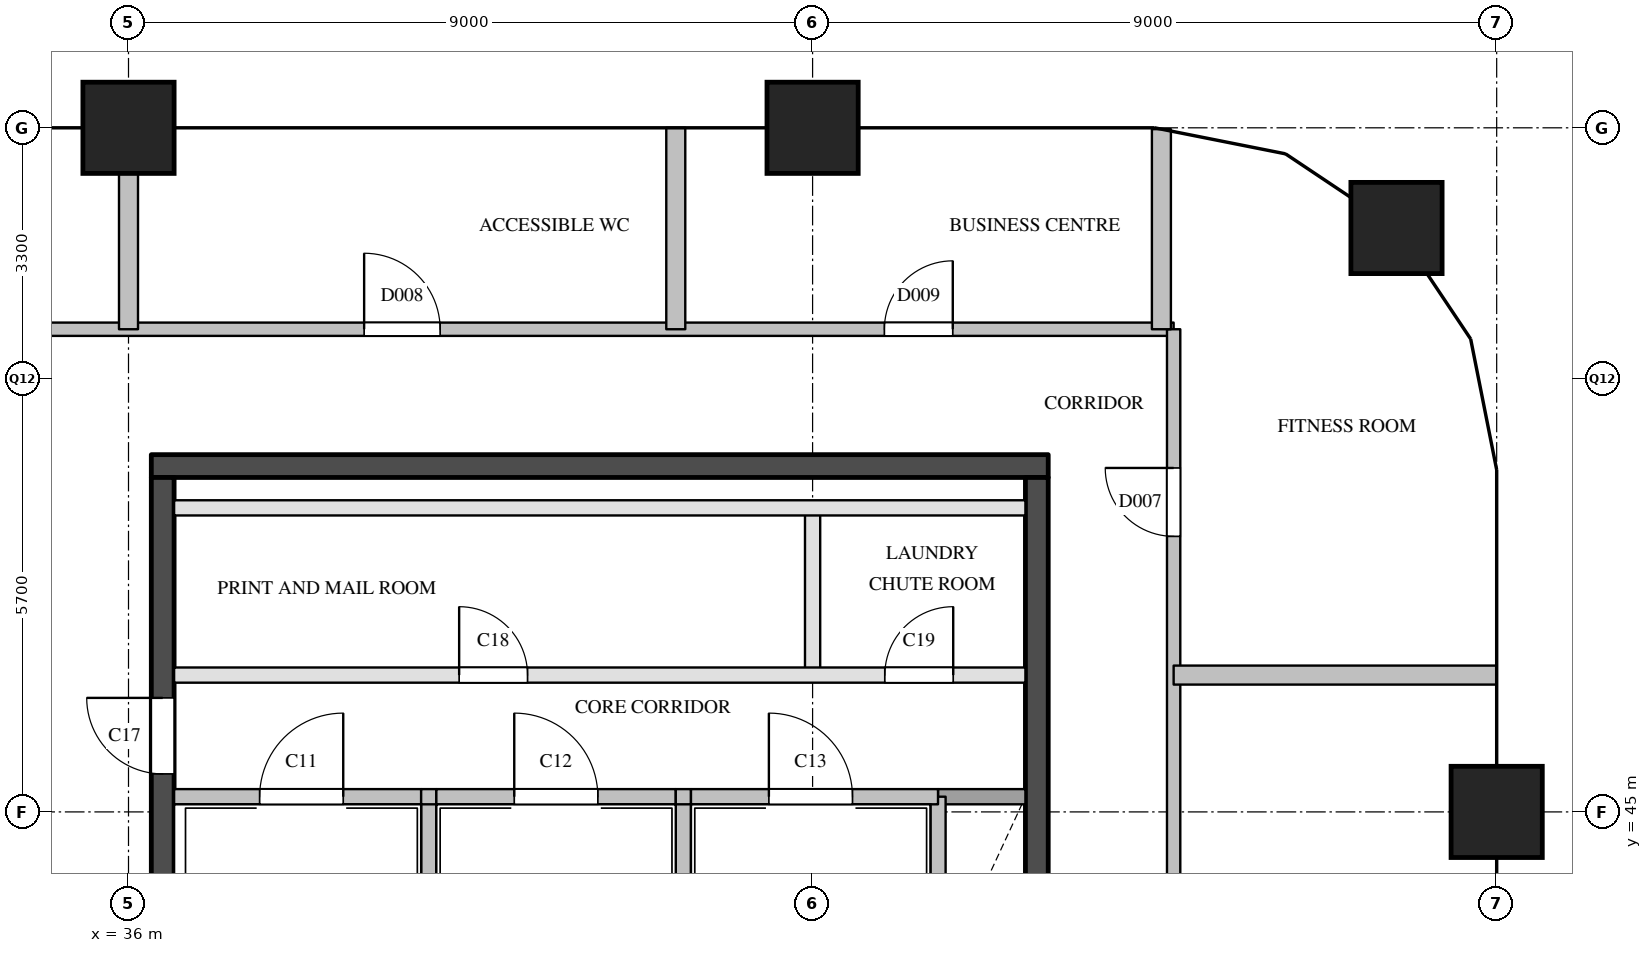
"""IFC4 building model, lengths in metres.
Left out: names, types, materials, properties, quantities, classifications, styles, units other than length and angle.
Written with IfcOpenShell. Run it as: python <this file> out.ifc"""

import sys

from ifc_helpers import new_model, si_unit, direction, frame, frame_2d, origin, origin_2d, place, context, subcontext, project, spatial, rectangle, extrude, element, fill, save


model = new_model("IFC4")
c1 = context("Model", 3, precision=1e-05, world=origin(), true_north=direction((0.0, 1.0)))
c2 = subcontext(c1, "Body", "Model", "MODEL_VIEW")
j1 = project(units=[si_unit("LENGTHUNIT", "METRE"), si_unit("PLANEANGLEUNIT", "RADIAN")], contexts=[c1])
p1 = place(None, origin())
s1 = spatial("IfcSite", under=j1, at=p1, CompositionType="ELEMENT")
p2 = place(p1, origin())
s2 = spatial("IfcBuilding", under=s1, at=p2, CompositionType="ELEMENT")
p3 = place(p2, frame((0.0, 0.0, 290.2)))
s3 = spatial("IfcBuildingStorey", under=s2, at=p3, CompositionType="ELEMENT", Elevation=290.2)
for number, where, z_axis, x_axis in (
    (1, (36.0, 54.0, 0.0), (0.0, 0.0, 1.0), (1.0, 0.0, 0.0)),
    (2, (45.0, 54.0, 0.0), (0.0, 0.0, 1.0), (1.0, 0.0, 0.0)),
    (3, (54.0, 45.0, 0.0), (0.0, 0.0, 1.0), (1.0, 0.0, 0.0)),
    (4, (52.682, 52.682, 0.0), (0.0, 0.0, 1.0), (1.0, 0.0, 0.0)),
):
    element("IfcColumn", number, at=place(p3, frame(where, z_axis=z_axis, x_axis=x_axis)), inside=s3, PredefinedType="COLUMN", context=c2, shape_type="SweptSolid", body=[
        extrude(rectangle(XDim=1.2, YDim=1.2, at=origin_2d()), origin(), (0.0, 0.0, 1.0), 5.0),
    ])
p4 = place(p3, frame((36.3, 49.55, 0.0), z_axis=(0.0, 0.0, 1.0), x_axis=(1.0, 0.0, 0.0)))
e5 = element("IfcWall", 5, at=p4, inside=s3, PredefinedType="SHEAR", context=c2, shape_type="SweptSolid", body=[
    extrude(rectangle(XDim=11.8, YDim=0.3, at=frame_2d((5.9, 0.0))), origin(), (0.0, 0.0, 1.0), 4.5),
])
p5 = place(p3, frame((36.45, 29.1, 0.0), z_axis=(0.0, 0.0, 1.0), x_axis=(0.0, 1.0, 0.0)))
e6 = element("IfcWall", 6, at=p5, inside=s3, PredefinedType="SHEAR", context=c2, shape_type="SweptSolid", body=[
    extrude(rectangle(XDim=20.3, YDim=0.3, at=frame_2d((10.15, 0.0))), origin(), (0.0, 0.0, 1.0), 4.5),
])
p6 = place(p5, frame((3.6, 0.0, 0.0)))
e7 = element("IfcOpeningElement", 7, at=p6, cuts=e6, PredefinedType="OPENING", context=c2, shape_type="SweptSolid", body=[
    extrude(rectangle(XDim=1.8, YDim=2.1, at=frame_2d((0.9, 1.05))), frame((0.0, 0.16, 0.0), z_axis=(0.0, -1.0, 0.0), x_axis=(1.0, 0.0, 0.0)), (0.0, 0.0, 1.0), 0.32),
])
p7 = place(p5, frame((16.4, 0.0, 0.0)))
e8 = element("IfcOpeningElement", 8, at=p7, cuts=e6, PredefinedType="OPENING", context=c2, shape_type="SweptSolid", body=[
    extrude(rectangle(XDim=1.0, YDim=2.1, at=frame_2d((0.5, 1.05))), frame((0.0, 0.16, 0.0), z_axis=(0.0, -1.0, 0.0), x_axis=(1.0, 0.0, 0.0)), (0.0, 0.0, 1.0), 0.32),
])
p8 = place(p3, frame((47.95, 29.1, 0.0), z_axis=(0.0, 0.0, 1.0), x_axis=(0.0, 1.0, 0.0)))
e9 = element("IfcWall", 9, at=p8, inside=s3, PredefinedType="SHEAR", context=c2, shape_type="SweptSolid", body=[
    extrude(rectangle(XDim=20.3, YDim=0.3, at=frame_2d((10.15, 0.0))), origin(), (0.0, 0.0, 1.0), 4.5),
])
p9 = place(p8, frame((12.5, 0.0, 0.0)))
e10 = element("IfcOpeningElement", 10, at=p9, cuts=e9, PredefinedType="OPENING", context=c2, shape_type="SweptSolid", body=[
    extrude(rectangle(XDim=0.7, YDim=2.1, at=frame_2d((0.35, 1.05))), frame((0.0, 0.16, 0.0), z_axis=(0.0, -1.0, 0.0), x_axis=(1.0, 0.0, 0.0)), (0.0, 0.0, 1.0), 0.32),
])
p10 = place(p8, frame((3.9, 0.0, 0.0)))
e11 = element("IfcOpeningElement", 11, at=p10, cuts=e9, PredefinedType="OPENING", context=c2, shape_type="SweptSolid", body=[
    extrude(rectangle(XDim=1.8, YDim=2.1, at=frame_2d((0.9, 1.05))), frame((0.0, 0.16, 0.0), z_axis=(0.0, -1.0, 0.0), x_axis=(1.0, 0.0, 0.0)), (0.0, 0.0, 1.0), 0.32),
])
for number, where, z_axis, x_axis in (
    (12, (39.95, 43.58, 0.0), (0.0, 0.0, 1.0), (0.0, 1.0, 0.0)),
    (13, (43.3, 43.58, 0.0), (0.0, 0.0, 1.0), (0.0, 1.0, 0.0)),
):
    element("IfcWall", number, at=place(p3, frame(where, z_axis=z_axis, x_axis=x_axis)), inside=s3, PredefinedType="SOLIDWALL", context=c2, shape_type="SweptSolid", body=[
        extrude(rectangle(XDim=1.62, YDim=0.2, at=frame_2d((0.81, 0.0))), origin(), (0.0, 0.0, 1.0), 4.5),
    ])
p11 = place(p3, frame((45.0, 46.8, 0.0), z_axis=(0.0, 0.0, 1.0), x_axis=(0.0, 1.0, 0.0)))
e14 = element("IfcWall", 14, at=p11, inside=s3, PredefinedType="PARTITIONING", context=c2, shape_type="SweptSolid", body=[
    extrude(rectangle(XDim=2.2, YDim=0.2, at=frame_2d((1.1, 0.0))), origin(), (0.0, 0.0, 1.0), 4.5),
])
p12 = place(p3, frame((46.65, 43.58, 0.0), z_axis=(0.0, 0.0, 1.0), x_axis=(0.0, 1.0, 0.0)))
e15 = element("IfcWall", 15, at=p12, inside=s3, PredefinedType="SOLIDWALL", context=c2, shape_type="SweptSolid", body=[
    extrude(rectangle(XDim=1.62, YDim=0.2, at=frame_2d((0.81, 0.0))), origin(), (0.0, 0.0, 1.0), 4.5),
])
p13 = place(p3, frame((46.65, 45.2, 0.0), z_axis=(0.0, 0.0, 1.0), x_axis=(1.0, 0.0, 0.0)))
e16 = element("IfcWall", 16, at=p13, inside=s3, PredefinedType="SOLIDWALL", context=c2, shape_type="SweptSolid", body=[
    extrude(rectangle(XDim=1.15, YDim=0.2, at=frame_2d((0.575, 0.0))), origin(), (0.0, 0.0, 1.0), 4.5),
])
p14 = place(p3, frame((36.6, 45.2, 0.0), z_axis=(0.0, 0.0, 1.0), x_axis=(1.0, 0.0, 0.0)))
e17 = element("IfcWall", 17, at=p14, inside=s3, PredefinedType="SOLIDWALL", context=c2, shape_type="SweptSolid", body=[
    extrude(rectangle(XDim=3.25, YDim=0.2, at=frame_2d((1.625, 0.0))), origin(), (0.0, 0.0, 1.0), 4.5),
])
p15 = place(p14, frame((1.125, 0.0, 0.0)))
e18 = element("IfcOpeningElement", 18, at=p15, cuts=e17, PredefinedType="OPENING", context=c2, shape_type="SweptSolid", body=[
    extrude(rectangle(XDim=1.1, YDim=2.1, at=frame_2d((0.55, 1.05))), frame((0.0, 0.11, 0.0), z_axis=(0.0, -1.0, 0.0), x_axis=(1.0, 0.0, 0.0)), (0.0, 0.0, 1.0), 0.22),
])
p16 = place(p3, frame((39.85, 45.2, 0.0), z_axis=(0.0, 0.0, 1.0), x_axis=(1.0, 0.0, 0.0)))
e19 = element("IfcWall", 19, at=p16, inside=s3, PredefinedType="SOLIDWALL", context=c2, shape_type="SweptSolid", body=[
    extrude(rectangle(XDim=0.2, YDim=0.2, at=frame_2d((0.1, 0.0))), origin(), (0.0, 0.0, 1.0), 4.5),
])
p17 = place(p3, frame((40.05, 45.2, 0.0), z_axis=(0.0, 0.0, 1.0), x_axis=(1.0, 0.0, 0.0)))
e20 = element("IfcWall", 20, at=p17, inside=s3, PredefinedType="SOLIDWALL", context=c2, shape_type="SweptSolid", body=[
    extrude(rectangle(XDim=3.15, YDim=0.2, at=frame_2d((1.575, 0.0))), origin(), (0.0, 0.0, 1.0), 4.5),
])
p18 = place(p17, frame((1.025, 0.0, 0.0)))
e21 = element("IfcOpeningElement", 21, at=p18, cuts=e20, PredefinedType="OPENING", context=c2, shape_type="SweptSolid", body=[
    extrude(rectangle(XDim=1.1, YDim=2.1, at=frame_2d((0.55, 1.05))), frame((0.0, 0.11, 0.0), z_axis=(0.0, -1.0, 0.0), x_axis=(1.0, 0.0, 0.0)), (0.0, 0.0, 1.0), 0.22),
])
p19 = place(p3, frame((43.2, 45.2, 0.0), z_axis=(0.0, 0.0, 1.0), x_axis=(1.0, 0.0, 0.0)))
e22 = element("IfcWall", 22, at=p19, inside=s3, PredefinedType="SOLIDWALL", context=c2, shape_type="SweptSolid", body=[
    extrude(rectangle(XDim=0.2, YDim=0.2, at=frame_2d((0.1, 0.0))), origin(), (0.0, 0.0, 1.0), 4.5),
])
p20 = place(p3, frame((43.4, 45.2, 0.0), z_axis=(0.0, 0.0, 1.0), x_axis=(1.0, 0.0, 0.0)))
e23 = element("IfcWall", 23, at=p20, inside=s3, PredefinedType="SOLIDWALL", context=c2, shape_type="SweptSolid", body=[
    extrude(rectangle(XDim=3.25, YDim=0.2, at=frame_2d((1.625, 0.0))), origin(), (0.0, 0.0, 1.0), 4.5),
])
p21 = place(p20, frame((1.025, 0.0, 0.0)))
e24 = element("IfcOpeningElement", 24, at=p21, cuts=e23, PredefinedType="OPENING", context=c2, shape_type="SweptSolid", body=[
    extrude(rectangle(XDim=1.1, YDim=2.1, at=frame_2d((0.55, 1.05))), frame((0.0, 0.11, 0.0), z_axis=(0.0, -1.0, 0.0), x_axis=(1.0, 0.0, 0.0)), (0.0, 0.0, 1.0), 0.22),
])
p22 = place(p3, frame((36.6, 46.8, 0.0), z_axis=(0.0, 0.0, 1.0), x_axis=(1.0, 0.0, 0.0)))
e25 = element("IfcWall", 25, at=p22, inside=s3, PredefinedType="PARTITIONING", context=c2, shape_type="SweptSolid", body=[
    extrude(rectangle(XDim=11.2, YDim=0.2, at=frame_2d((5.6, 0.0))), origin(), (0.0, 0.0, 1.0), 4.5),
])
p23 = place(p22, frame((3.75, 0.0, 0.0)))
e26 = element("IfcOpeningElement", 26, at=p23, cuts=e25, PredefinedType="OPENING", context=c2, shape_type="SweptSolid", body=[
    extrude(rectangle(XDim=0.9, YDim=2.1, at=frame_2d((0.45, 1.05))), frame((0.0, 0.11, 0.0), z_axis=(0.0, -1.0, 0.0), x_axis=(1.0, 0.0, 0.0)), (0.0, 0.0, 1.0), 0.22),
])
p24 = place(p22, frame((9.35, 0.0, 0.0)))
e27 = element("IfcOpeningElement", 27, at=p24, cuts=e25, PredefinedType="OPENING", context=c2, shape_type="SweptSolid", body=[
    extrude(rectangle(XDim=0.9, YDim=2.1, at=frame_2d((0.45, 1.05))), frame((0.0, 0.11, 0.0), z_axis=(0.0, -1.0, 0.0), x_axis=(1.0, 0.0, 0.0)), (0.0, 0.0, 1.0), 0.22),
])
p25 = place(p3, frame((36.6, 49.0, 0.0), z_axis=(0.0, 0.0, 1.0), x_axis=(1.0, 0.0, 0.0)))
e28 = element("IfcWall", 28, at=p25, inside=s3, PredefinedType="PARTITIONING", context=c2, shape_type="SweptSolid", body=[
    extrude(rectangle(XDim=11.2, YDim=0.2, at=frame_2d((5.6, 0.0))), origin(), (0.0, 0.0, 1.0), 4.5),
])
p26 = place(p3, frame((34.65, 51.35, 0.0), z_axis=(0.0, 0.0, 1.0), x_axis=(1.0, 0.0, 0.0)))
e29 = element("IfcWall", 29, at=p26, inside=s3, PredefinedType="PARTITIONING", context=c2, shape_type="SweptSolid", body=[
    extrude(rectangle(XDim=15.1, YDim=0.175, at=frame_2d((7.55, 0.0))), origin(), (0.0, 0.0, 1.0), 4.5),
])
p27 = place(p26, frame((4.45, 0.0, 0.0)))
e30 = element("IfcOpeningElement", 30, at=p27, cuts=e29, PredefinedType="OPENING", context=c2, shape_type="SweptSolid", body=[
    extrude(rectangle(XDim=1.0, YDim=2.1, at=frame_2d((0.5, 1.05))), frame((0.0, 0.097, 0.0), z_axis=(0.0, -1.0, 0.0), x_axis=(1.0, 0.0, 0.0)), (0.0, 0.0, 1.0), 0.195),
])
p28 = place(p26, frame((11.294, 0.0, 0.0)))
e31 = element("IfcOpeningElement", 31, at=p28, cuts=e29, PredefinedType="OPENING", context=c2, shape_type="SweptSolid", body=[
    extrude(rectangle(XDim=0.9, YDim=2.1, at=frame_2d((0.45, 1.05))), frame((0.0, 0.097, 0.0), z_axis=(0.0, -1.0, 0.0), x_axis=(1.0, 0.0, 0.0)), (0.0, 0.0, 1.0), 0.195),
])
p29 = place(p3, frame((49.75, 28.5, 0.0), z_axis=(0.0, 0.0, 1.0), x_axis=(0.0, 1.0, 0.0)))
e32 = element("IfcWall", 32, at=p29, inside=s3, PredefinedType="PARTITIONING", context=c2, shape_type="SweptSolid", body=[
    extrude(rectangle(XDim=22.85, YDim=0.175, at=frame_2d((11.425, 0.0))), origin(), (0.0, 0.0, 1.0), 4.5),
])
p30 = place(p29, frame((3.3, 0.0, 0.0)))
e33 = element("IfcOpeningElement", 33, at=p30, cuts=e32, PredefinedType="OPENING", context=c2, shape_type="SweptSolid", body=[
    extrude(rectangle(XDim=0.9, YDim=2.1, at=frame_2d((0.45, 1.05))), frame((0.0, 0.097, 0.0), z_axis=(0.0, -1.0, 0.0), x_axis=(1.0, 0.0, 0.0)), (0.0, 0.0, 1.0), 0.195),
])
p31 = place(p29, frame((12.45, 0.0, 0.0)))
e34 = element("IfcOpeningElement", 34, at=p31, cuts=e32, PredefinedType="OPENING", context=c2, shape_type="SweptSolid", body=[
    extrude(rectangle(XDim=0.9, YDim=2.1, at=frame_2d((0.45, 1.05))), frame((0.0, 0.097, 0.0), z_axis=(0.0, -1.0, 0.0), x_axis=(1.0, 0.0, 0.0)), (0.0, 0.0, 1.0), 0.195),
])
p32 = place(p29, frame((20.125, 0.0, 0.0)))
e35 = element("IfcOpeningElement", 35, at=p32, cuts=e32, PredefinedType="OPENING", context=c2, shape_type="SweptSolid", body=[
    extrude(rectangle(XDim=0.9, YDim=2.1, at=frame_2d((0.45, 1.05))), frame((0.0, 0.097, 0.0), z_axis=(0.0, -1.0, 0.0), x_axis=(1.0, 0.0, 0.0)), (0.0, 0.0, 1.0), 0.195),
])
p33 = place(p3, frame((49.75, 46.8, 0.0), z_axis=(0.0, 0.0, 1.0), x_axis=(1.0, 0.0, 0.0)))
e36 = element("IfcWall", 36, at=p33, inside=s3, PredefinedType="PARTITIONING", context=c2, shape_type="SweptSolid", body=[
    extrude(rectangle(XDim=4.25, YDim=0.25, at=frame_2d((2.125, 0.0))), origin(), (0.0, 0.0, 1.0), 3.5),
])
p34 = place(p3, frame((36.0, 51.35, 0.0), z_axis=(0.0, 0.0, 1.0), x_axis=(0.0, 1.0, 0.0)))
e37 = element("IfcWall", 37, at=p34, inside=s3, PredefinedType="PARTITIONING", context=c2, shape_type="SweptSolid", body=[
    extrude(rectangle(XDim=2.65, YDim=0.25, at=frame_2d((1.325, 0.0))), origin(), (0.0, 0.0, 1.0), 4.5),
])
p35 = place(p3, frame((43.2, 51.35, 0.0), z_axis=(0.0, 0.0, 1.0), x_axis=(0.0, 1.0, 0.0)))
e38 = element("IfcWall", 38, at=p35, inside=s3, PredefinedType="PARTITIONING", context=c2, shape_type="SweptSolid", body=[
    extrude(rectangle(XDim=2.65, YDim=0.25, at=frame_2d((1.325, 0.0))), origin(), (0.0, 0.0, 1.0), 3.5),
])
p36 = place(p3, frame((49.589, 51.35, 0.0), z_axis=(0.0, 0.0, 1.0), x_axis=(0.0, 1.0, 0.0)))
e39 = element("IfcWall", 39, at=p36, inside=s3, PredefinedType="PARTITIONING", context=c2, shape_type="SweptSolid", body=[
    extrude(rectangle(XDim=2.632, YDim=0.25, at=frame_2d((1.316, 0.0))), origin(), (0.0, 0.0, 1.0), 3.5),
])
p37 = place(p15, origin())
e40 = element("IfcDoor", 40, at=p37, inside=s3, OperationType="SINGLE_SWING_RIGHT", PredefinedType="DOOR", context=c2, shape_type="SweptSolid", body=[
    extrude(rectangle(XDim=1.1, YDim=2.1, at=frame_2d((0.55, 1.05))), frame((0.0, 0.025, 0.0), z_axis=(0.0, -1.0, 0.0), x_axis=(1.0, 0.0, 0.0)), (0.0, 0.0, 1.0), 0.05),
])
fill(e18, e40)
p38 = place(p18, origin())
e41 = element("IfcDoor", 41, at=p38, inside=s3, OperationType="SINGLE_SWING_LEFT", PredefinedType="DOOR", context=c2, shape_type="SweptSolid", body=[
    extrude(rectangle(XDim=1.1, YDim=2.1, at=frame_2d((0.55, 1.05))), frame((0.0, 0.025, 0.0), z_axis=(0.0, -1.0, 0.0), x_axis=(1.0, 0.0, 0.0)), (0.0, 0.0, 1.0), 0.05),
])
fill(e21, e41)
p39 = place(p21, origin())
e42 = element("IfcDoor", 42, at=p39, inside=s3, OperationType="SINGLE_SWING_LEFT", PredefinedType="DOOR", context=c2, shape_type="SweptSolid", body=[
    extrude(rectangle(XDim=1.1, YDim=2.1, at=frame_2d((0.55, 1.05))), frame((0.0, 0.025, 0.0), z_axis=(0.0, -1.0, 0.0), x_axis=(1.0, 0.0, 0.0)), (0.0, 0.0, 1.0), 0.05),
])
fill(e24, e42)
p40 = place(p7, origin())
e43 = element("IfcDoor", 43, at=p40, inside=s3, OperationType="SINGLE_SWING_RIGHT", PredefinedType="DOOR", context=c2, shape_type="SweptSolid", body=[
    extrude(rectangle(XDim=1.0, YDim=2.1, at=frame_2d((0.5, 1.05))), frame((0.0, 0.025, 0.0), z_axis=(0.0, -1.0, 0.0), x_axis=(1.0, 0.0, 0.0)), (0.0, 0.0, 1.0), 0.05),
])
fill(e8, e43)
p41 = place(p23, origin())
e44 = element("IfcDoor", 44, at=p41, inside=s3, OperationType="SINGLE_SWING_LEFT", PredefinedType="DOOR", context=c2, shape_type="SweptSolid", body=[
    extrude(rectangle(XDim=0.9, YDim=2.1, at=frame_2d((0.45, 1.05))), frame((0.0, 0.025, 0.0), z_axis=(0.0, -1.0, 0.0), x_axis=(1.0, 0.0, 0.0)), (0.0, 0.0, 1.0), 0.05),
])
fill(e26, e44)
p42 = place(p24, origin())
e45 = element("IfcDoor", 45, at=p42, inside=s3, OperationType="SINGLE_SWING_RIGHT", PredefinedType="DOOR", context=c2, shape_type="SweptSolid", body=[
    extrude(rectangle(XDim=0.9, YDim=2.1, at=frame_2d((0.45, 1.05))), frame((0.0, 0.025, 0.0), z_axis=(0.0, -1.0, 0.0), x_axis=(1.0, 0.0, 0.0)), (0.0, 0.0, 1.0), 0.05),
])
fill(e27, e45)
p43 = place(p32, origin())
e46 = element("IfcDoor", 46, at=p43, inside=s3, OperationType="SINGLE_SWING_RIGHT", PredefinedType="DOOR", context=c2, shape_type="SweptSolid", body=[
    extrude(rectangle(XDim=0.9, YDim=2.1, at=frame_2d((0.45, 1.05))), frame((0.0, 0.025, 0.0), z_axis=(0.0, -1.0, 0.0), x_axis=(1.0, 0.0, 0.0)), (0.0, 0.0, 1.0), 0.05),
])
fill(e35, e46)
p44 = place(p27, origin())
e47 = element("IfcDoor", 47, at=p44, inside=s3, OperationType="SINGLE_SWING_LEFT", PredefinedType="DOOR", context=c2, shape_type="SweptSolid", body=[
    extrude(rectangle(XDim=1.0, YDim=2.1, at=frame_2d((0.5, 1.05))), frame((0.0, 0.025, 0.0), z_axis=(0.0, -1.0, 0.0), x_axis=(1.0, 0.0, 0.0)), (0.0, 0.0, 1.0), 0.05),
])
fill(e30, e47)
p45 = place(p28, origin())
e48 = element("IfcDoor", 48, at=p45, inside=s3, OperationType="SINGLE_SWING_RIGHT", PredefinedType="DOOR", context=c2, shape_type="SweptSolid", body=[
    extrude(rectangle(XDim=0.9, YDim=2.1, at=frame_2d((0.45, 1.05))), frame((0.0, 0.025, 0.0), z_axis=(0.0, -1.0, 0.0), x_axis=(1.0, 0.0, 0.0)), (0.0, 0.0, 1.0), 0.05),
])
fill(e31, e48)
save(model, sys.argv[1])
